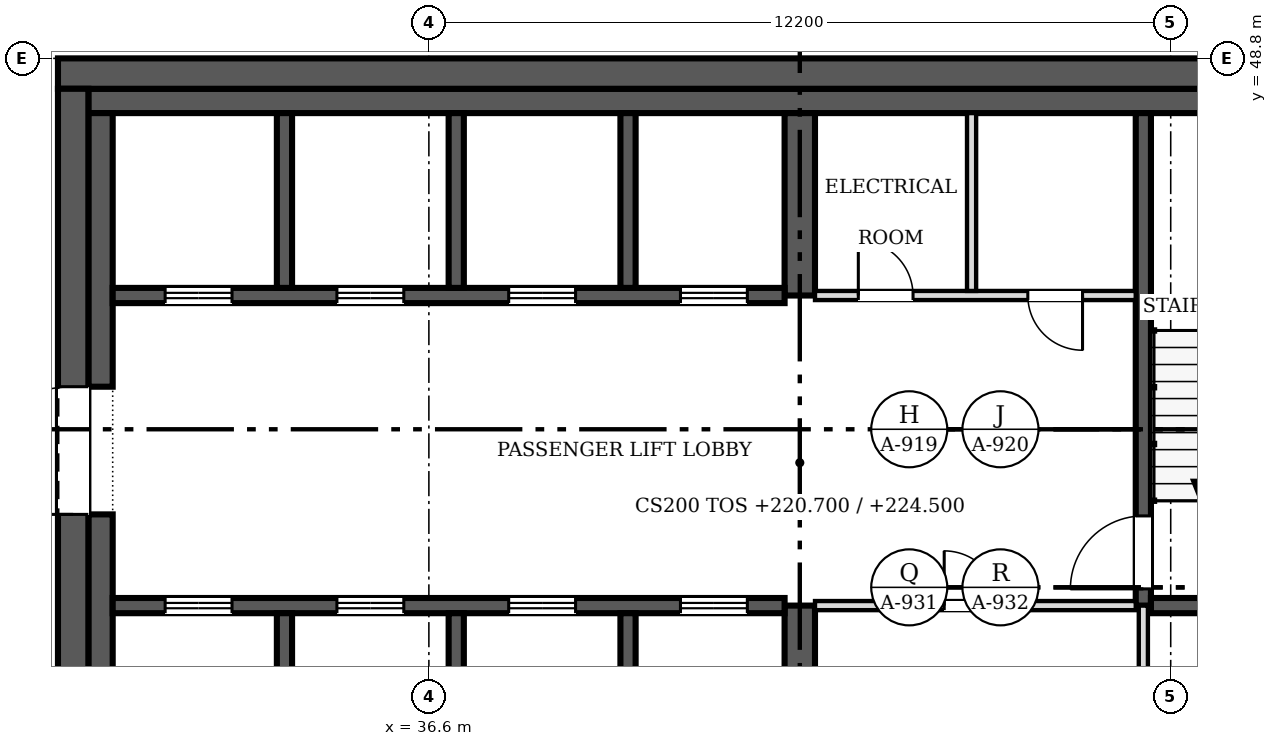
"""IFC4 building model, lengths in metres.
Left out: names, types, materials, properties, quantities, classifications, styles, units other than length and angle.
Written with IfcOpenShell. Run it as: python <this file> out.ifc"""

import sys

from ifc_helpers import new_model, si_unit, direction, frame, frame_2d, origin, place, context, subcontext, project, spatial, rectangle, extrude, source, transform, mapped, element, fill, save


model = new_model("IFC4")
c1 = context("Model", 3, precision=1e-05, world=origin(), true_north=direction((0.0, 1.0)))
c2 = subcontext(c1, "Body", "Model", "MODEL_VIEW")
j1 = project(units=[si_unit("LENGTHUNIT", "METRE"), si_unit("PLANEANGLEUNIT", "RADIAN")], contexts=[c1])
p1 = place(None, origin())
s1 = spatial("IfcSite", under=j1, at=p1, CompositionType="ELEMENT")
p2 = place(p1, origin())
s2 = spatial("IfcBuilding", under=s1, at=p2, CompositionType="ELEMENT")
p3 = place(p2, frame((0.0, 0.0, 220.7)))
s3 = spatial("IfcBuildingStorey", under=s2, at=p3, CompositionType="ELEMENT", Elevation=220.7)
p4 = place(p3, frame((30.75, 24.9, 0.0), z_axis=(0.0, 0.0, 1.0), x_axis=(0.0, 1.0, 0.0)))
e1 = element("IfcWall", 1, at=p4, inside=s3, PredefinedType="SHEAR", context=c2, shape_type="SweptSolid", body=[
    extrude(rectangle(XDim=23.4, YDim=0.5, at=frame_2d((11.7, 0.0))), origin(), (0.0, 0.0, 1.0), 3.8),
])
m1 = source(origin(), c2, "Body", "SweptSolid", [
    extrude(rectangle(XDim=2.1, YDim=2.4, at=frame_2d((1.05, 1.2))), frame((0.0, 0.26, 0.0), z_axis=(0.0, -1.0, 0.0), x_axis=(1.0, 0.0, 0.0)), (0.0, 0.0, 1.0), 0.52),
])
p5 = place(p4, frame((4.9, 0.0, 0.0)))
e2 = element("IfcOpeningElement", 2, at=p5, cuts=e1, PredefinedType="OPENING", context=c2, shape_type="MappedRepresentation", body=[
    mapped(m1, transform((0.0, 0.0, 0.0), scale=1.0)),
])
p6 = place(p4, frame((16.4, 0.0, 0.0)))
e3 = element("IfcOpeningElement", 3, at=p6, cuts=e1, PredefinedType="OPENING", context=c2, shape_type="MappedRepresentation", body=[
    mapped(m1, transform((0.0, 0.0, 0.0), scale=1.0)),
])
p7 = place(p3, frame((30.5, 48.55, 0.0), z_axis=(0.0, 0.0, 1.0), x_axis=(1.0, 0.0, 0.0)))
e4 = element("IfcWall", 4, at=p7, inside=s3, PredefinedType="SHEAR", context=c2, shape_type="SweptSolid", body=[
    extrude(rectangle(XDim=24.4, YDim=0.5, at=frame_2d((12.2, 0.0))), origin(), (0.0, 0.0, 1.0), 3.8),
])
p8 = place(p3, frame((31.0, 48.1, 0.0), z_axis=(0.0, 0.0, 1.0), x_axis=(1.0, 0.0, 0.0)))
e5 = element("IfcWall", 5, at=p8, inside=s3, PredefinedType="SOLIDWALL", context=c2, shape_type="SweptSolid", body=[
    extrude(rectangle(XDim=23.4, YDim=0.4, at=frame_2d((11.7, 0.0))), origin(), (0.0, 0.0, 1.0), 3.8),
])
p9 = place(p3, frame((31.2, 31.9, 0.0), z_axis=(0.0, 0.0, 1.0), x_axis=(0.0, 1.0, 0.0)))
e6 = element("IfcWall", 6, at=p9, inside=s3, PredefinedType="SOLIDWALL", context=c2, shape_type="SweptSolid", body=[
    extrude(rectangle(XDim=9.4, YDim=0.4, at=frame_2d((4.7, 0.0))), origin(), (0.0, 0.0, 1.0), 3.8),
])
p10 = place(p3, frame((31.2, 43.4, 0.0), z_axis=(0.0, 0.0, 1.0), x_axis=(0.0, 1.0, 0.0)))
e7 = element("IfcWall", 7, at=p10, inside=s3, PredefinedType="SOLIDWALL", context=c2, shape_type="SweptSolid", body=[
    extrude(rectangle(XDim=4.5, YDim=0.4, at=frame_2d((2.25, 0.0))), origin(), (0.0, 0.0, 1.0), 3.8),
])
p11 = place(p3, frame((42.7, 36.85, 0.0), z_axis=(0.0, 0.0, 1.0), x_axis=(0.0, 1.0, 0.0)))
e8 = element("IfcWall", 8, at=p11, inside=s3, PredefinedType="SHEAR", context=c2, shape_type="SweptSolid", body=[
    extrude(rectangle(XDim=2.95, YDim=0.5, at=frame_2d((1.475, 0.0))), origin(), (0.0, 0.0, 1.0), 3.8),
])
p12 = place(p3, frame((42.7, 44.9, 0.0), z_axis=(0.0, 0.0, 1.0), x_axis=(0.0, 1.0, 0.0)))
e9 = element("IfcWall", 9, at=p12, inside=s3, PredefinedType="SHEAR", context=c2, shape_type="SweptSolid", body=[
    extrude(rectangle(XDim=3.0, YDim=0.5, at=frame_2d((1.5, 0.0))), origin(), (0.0, 0.0, 1.0), 3.8),
])
p13 = place(p3, frame((31.4, 39.8, 0.0), z_axis=(0.0, 0.0, 1.0), x_axis=(1.0, 0.0, 0.0)))
e10 = element("IfcWall", 10, at=p13, inside=s3, PredefinedType="SOLIDWALL", context=c2, shape_type="SweptSolid", body=[
    extrude(rectangle(XDim=11.05, YDim=0.25, at=frame_2d((5.525, 0.0))), origin(), (0.0, 0.0, 1.0), 3.8),
])
m2 = source(origin(), c2, "Body", "SweptSolid", [
    extrude(rectangle(XDim=1.1, YDim=2.1, at=frame_2d((0.55, 1.05))), frame((0.0, 0.135, 0.0), z_axis=(0.0, -1.0, 0.0), x_axis=(1.0, 0.0, 0.0)), (0.0, 0.0, 1.0), 0.27),
])
p14 = place(p13, frame((0.863, 0.0, 0.0)))
e11 = element("IfcOpeningElement", 11, at=p14, cuts=e10, PredefinedType="OPENING", context=c2, shape_type="MappedRepresentation", body=[
    mapped(m2, transform((0.0, 0.0, 0.0), scale=1.0)),
])
p15 = place(p13, frame((3.688, 0.0, 0.0)))
e12 = element("IfcOpeningElement", 12, at=p15, cuts=e10, PredefinedType="OPENING", context=c2, shape_type="MappedRepresentation", body=[
    mapped(m2, transform((0.0, 0.0, 0.0), scale=1.0)),
])
p16 = place(p13, frame((6.512, 0.0, 0.0)))
e13 = element("IfcOpeningElement", 13, at=p16, cuts=e10, PredefinedType="OPENING", context=c2, shape_type="MappedRepresentation", body=[
    mapped(m2, transform((0.0, 0.0, 0.0), scale=1.0)),
])
p17 = place(p13, frame((9.337, 0.0, 0.0)))
e14 = element("IfcOpeningElement", 14, at=p17, cuts=e10, PredefinedType="OPENING", context=c2, shape_type="MappedRepresentation", body=[
    mapped(m2, transform((0.0, 0.0, 0.0), scale=1.0)),
])
p18 = place(p3, frame((42.45, 44.9, 0.0), z_axis=(0.0, 0.0, 1.0), x_axis=(-1.0, 0.0, 0.0)))
e15 = element("IfcWall", 15, at=p18, inside=s3, PredefinedType="SOLIDWALL", context=c2, shape_type="SweptSolid", body=[
    extrude(rectangle(XDim=11.05, YDim=0.25, at=frame_2d((5.525, 0.0))), origin(), (0.0, 0.0, 1.0), 3.8),
])
p19 = place(p18, frame((9.087, 0.0, 0.0)))
e16 = element("IfcOpeningElement", 16, at=p19, cuts=e15, PredefinedType="OPENING", context=c2, shape_type="MappedRepresentation", body=[
    mapped(m2, transform((0.0, 0.0, 0.0), scale=1.0)),
])
p20 = place(p18, frame((6.262, 0.0, 0.0)))
e17 = element("IfcOpeningElement", 17, at=p20, cuts=e15, PredefinedType="OPENING", context=c2, shape_type="MappedRepresentation", body=[
    mapped(m2, transform((0.0, 0.0, 0.0), scale=1.0)),
])
p21 = place(p18, frame((3.438, 0.0, 0.0)))
e18 = element("IfcOpeningElement", 18, at=p21, cuts=e15, PredefinedType="OPENING", context=c2, shape_type="MappedRepresentation", body=[
    mapped(m2, transform((0.0, 0.0, 0.0), scale=1.0)),
])
p22 = place(p18, frame((0.613, 0.0, 0.0)))
e19 = element("IfcOpeningElement", 19, at=p22, cuts=e15, PredefinedType="OPENING", context=c2, shape_type="MappedRepresentation", body=[
    mapped(m2, transform((0.0, 0.0, 0.0), scale=1.0)),
])
p23 = place(p3, frame((48.35, 47.9, 0.0), z_axis=(0.0, 0.0, 1.0), x_axis=(0.0, -1.0, 0.0)))
e20 = element("IfcWall", 20, at=p23, inside=s3, PredefinedType="SOLIDWALL", context=c2, shape_type="SweptSolid", body=[
    extrude(rectangle(XDim=8.1, YDim=0.25, at=frame_2d((4.05, 0.0))), origin(), (0.0, 0.0, 1.0), 3.8),
])
m3 = source(origin(), c2, "Body", "SweptSolid", [
    extrude(rectangle(XDim=1.2, YDim=2.1, at=frame_2d((0.6, 1.05))), frame((0.0, 0.135, 0.0), z_axis=(0.0, -1.0, 0.0), x_axis=(1.0, 0.0, 0.0)), (0.0, 0.0, 1.0), 0.27),
])
p24 = place(p23, frame((6.625, 0.0, 0.0)))
e21 = element("IfcOpeningElement", 21, at=p24, cuts=e20, PredefinedType="OPENING", context=c2, shape_type="MappedRepresentation", body=[
    mapped(m3, transform((0.0, 0.0, 0.0), scale=1.0)),
])
p25 = place(p3, frame((48.475, 39.8, 0.0), z_axis=(0.0, 0.0, 1.0), x_axis=(1.0, 0.0, 0.0)))
e22 = element("IfcWall", 22, at=p25, inside=s3, PredefinedType="SOLIDWALL", context=c2, shape_type="SweptSolid", body=[
    extrude(rectangle(XDim=3.4, YDim=0.25, at=frame_2d((1.7, 0.0))), origin(), (0.0, 0.0, 1.0), 3.8),
])
for number, where, z_axis, x_axis in (
    (23, (34.225, 36.85, 0.0), (0.0, 0.0, 1.0), (0.0, 1.0, 0.0)),
    (24, (37.05, 36.85, 0.0), (0.0, 0.0, 1.0), (0.0, 1.0, 0.0)),
    (25, (39.875, 36.85, 0.0), (0.0, 0.0, 1.0), (0.0, 1.0, 0.0)),
):
    element("IfcWall", number, at=place(p3, frame(where, z_axis=z_axis, x_axis=x_axis)), inside=s3, PredefinedType="SOLIDWALL", context=c2, shape_type="SweptSolid", body=[
        extrude(rectangle(XDim=2.825, YDim=0.25, at=frame_2d((1.413, 0.0))), origin(), (0.0, 0.0, 1.0), 3.8),
    ])
for number, where, z_axis, x_axis in (
    (26, (34.225, 45.025, 0.0), (0.0, 0.0, 1.0), (0.0, 1.0, 0.0)),
    (27, (37.05, 45.025, 0.0), (0.0, 0.0, 1.0), (0.0, 1.0, 0.0)),
    (28, (39.875, 45.025, 0.0), (0.0, 0.0, 1.0), (0.0, 1.0, 0.0)),
):
    element("IfcWall", number, at=place(p3, frame(where, z_axis=z_axis, x_axis=x_axis)), inside=s3, PredefinedType="SOLIDWALL", context=c2, shape_type="SweptSolid", body=[
        extrude(rectangle(XDim=2.875, YDim=0.25, at=frame_2d((1.438, 0.0))), origin(), (0.0, 0.0, 1.0), 3.8),
    ])
p26 = place(p3, frame((48.225, 39.8, 0.0), z_axis=(0.0, 0.0, 1.0), x_axis=(-1.0, 0.0, 0.0)))
e29 = element("IfcWall", 29, at=p26, inside=s3, PredefinedType="PARTITIONING", context=c2, shape_type="SweptSolid", body=[
    extrude(rectangle(XDim=5.275, YDim=0.15, at=frame_2d((2.638, 0.0))), origin(), (0.0, 0.0, 1.0), 3.6),
])
m4 = source(origin(), c2, "Body", "SweptSolid", [
    extrude(rectangle(XDim=0.9, YDim=2.1, at=frame_2d((0.45, 1.05))), frame((0.0, 0.085, 0.0), z_axis=(0.0, -1.0, 0.0), x_axis=(1.0, 0.0, 0.0)), (0.0, 0.0, 1.0), 0.17),
])
p27 = place(p26, frame((2.25, 0.0, 0.0)))
e30 = element("IfcOpeningElement", 30, at=p27, cuts=e29, PredefinedType="OPENING", context=c2, shape_type="MappedRepresentation", body=[
    mapped(m4, transform((0.0, 0.0, 0.0), scale=1.0)),
])
p28 = place(p3, frame((42.95, 44.9, 0.0), z_axis=(0.0, 0.0, 1.0), x_axis=(1.0, 0.0, 0.0)))
e31 = element("IfcWall", 31, at=p28, inside=s3, PredefinedType="PARTITIONING", context=c2, shape_type="SweptSolid", body=[
    extrude(rectangle(XDim=5.275, YDim=0.15, at=frame_2d((2.638, 0.0))), origin(), (0.0, 0.0, 1.0), 3.6),
])
p29 = place(p28, frame((0.712, 0.0, 0.0)))
e32 = element("IfcOpeningElement", 32, at=p29, cuts=e31, PredefinedType="OPENING", context=c2, shape_type="MappedRepresentation", body=[
    mapped(m4, transform((0.0, 0.0, 0.0), scale=1.0)),
])
p30 = place(p28, frame((3.5, 0.0, 0.0)))
e33 = element("IfcOpeningElement", 33, at=p30, cuts=e31, PredefinedType="OPENING", context=c2, shape_type="MappedRepresentation", body=[
    mapped(m4, transform((0.0, 0.0, 0.0), scale=1.0)),
])
p31 = place(p3, frame((48.35, 36.85, 0.0), z_axis=(0.0, 0.0, 1.0), x_axis=(0.0, 1.0, 0.0)))
e34 = element("IfcWall", 34, at=p31, inside=s3, PredefinedType="PARTITIONING", context=c2, shape_type="SweptSolid", body=[
    extrude(rectangle(XDim=2.95, YDim=0.15, at=frame_2d((1.475, 0.0))), origin(), (0.0, 0.0, 1.0), 3.6),
])
p32 = place(p3, frame((45.525, 44.975, 0.0), z_axis=(0.0, 0.0, 1.0), x_axis=(0.0, 1.0, 0.0)))
e35 = element("IfcWall", 35, at=p32, inside=s3, PredefinedType="PARTITIONING", context=c2, shape_type="SweptSolid", body=[
    extrude(rectangle(XDim=2.925, YDim=0.15, at=frame_2d((1.462, 0.0))), origin(), (0.0, 0.0, 1.0), 3.6),
])
m5 = source(origin(), c2, "Body", "SweptSolid", [
    extrude(rectangle(XDim=2.1, YDim=2.4, at=frame_2d((1.05, 1.2))), frame((0.0, 0.025, 0.0), z_axis=(0.0, -1.0, 0.0), x_axis=(1.0, 0.0, 0.0)), (0.0, 0.0, 1.0), 0.05),
])
p33 = place(p6, origin())
e36 = element("IfcDoor", 36, at=p33, inside=s3, OperationType="DOUBLE_DOOR_SINGLE_SWING", PredefinedType="DOOR", context=c2, shape_type="MappedRepresentation", body=[
    mapped(m5, transform((0.0, 0.0, 0.0), scale=1.0)),
])
fill(e3, e36)
m6 = source(origin(), c2, "Body", "SweptSolid", [
    extrude(rectangle(XDim=1.1, YDim=2.1, at=frame_2d((0.55, 1.05))), frame((0.0, 0.025, 0.0), z_axis=(0.0, -1.0, 0.0), x_axis=(1.0, 0.0, 0.0)), (0.0, 0.0, 1.0), 0.05),
])
p34 = place(p14, origin())
e37 = element("IfcDoor", 37, at=p34, inside=s3, OperationType="DOUBLE_DOOR_SLIDING", PredefinedType="DOOR", context=c2, shape_type="MappedRepresentation", body=[
    mapped(m6, transform((0.0, 0.0, 0.0), scale=1.0)),
])
fill(e11, e37)
p35 = place(p15, origin())
e38 = element("IfcDoor", 38, at=p35, inside=s3, OperationType="DOUBLE_DOOR_SLIDING", PredefinedType="DOOR", context=c2, shape_type="MappedRepresentation", body=[
    mapped(m6, transform((0.0, 0.0, 0.0), scale=1.0)),
])
fill(e12, e38)
p36 = place(p16, origin())
e39 = element("IfcDoor", 39, at=p36, inside=s3, OperationType="DOUBLE_DOOR_SLIDING", PredefinedType="DOOR", context=c2, shape_type="MappedRepresentation", body=[
    mapped(m6, transform((0.0, 0.0, 0.0), scale=1.0)),
])
fill(e13, e39)
p37 = place(p17, origin())
e40 = element("IfcDoor", 40, at=p37, inside=s3, OperationType="DOUBLE_DOOR_SLIDING", PredefinedType="DOOR", context=c2, shape_type="MappedRepresentation", body=[
    mapped(m6, transform((0.0, 0.0, 0.0), scale=1.0)),
])
fill(e14, e40)
p38 = place(p19, origin())
e41 = element("IfcDoor", 41, at=p38, inside=s3, OperationType="DOUBLE_DOOR_SLIDING", PredefinedType="DOOR", context=c2, shape_type="MappedRepresentation", body=[
    mapped(m6, transform((0.0, 0.0, 0.0), scale=1.0)),
])
fill(e16, e41)
p39 = place(p20, origin())
e42 = element("IfcDoor", 42, at=p39, inside=s3, OperationType="DOUBLE_DOOR_SLIDING", PredefinedType="DOOR", context=c2, shape_type="MappedRepresentation", body=[
    mapped(m6, transform((0.0, 0.0, 0.0), scale=1.0)),
])
fill(e17, e42)
p40 = place(p21, origin())
e43 = element("IfcDoor", 43, at=p40, inside=s3, OperationType="DOUBLE_DOOR_SLIDING", PredefinedType="DOOR", context=c2, shape_type="MappedRepresentation", body=[
    mapped(m6, transform((0.0, 0.0, 0.0), scale=1.0)),
])
fill(e18, e43)
p41 = place(p22, origin())
e44 = element("IfcDoor", 44, at=p41, inside=s3, OperationType="DOUBLE_DOOR_SLIDING", PredefinedType="DOOR", context=c2, shape_type="MappedRepresentation", body=[
    mapped(m6, transform((0.0, 0.0, 0.0), scale=1.0)),
])
fill(e19, e44)
m7 = source(origin(), c2, "Body", "SweptSolid", [
    extrude(rectangle(XDim=1.2, YDim=2.1, at=frame_2d((0.6, 1.05))), frame((0.0, 0.025, 0.0), z_axis=(0.0, -1.0, 0.0), x_axis=(1.0, 0.0, 0.0)), (0.0, 0.0, 1.0), 0.05),
])
p42 = place(p24, origin())
e45 = element("IfcDoor", 45, at=p42, inside=s3, OperationType="SINGLE_SWING_RIGHT", PredefinedType="DOOR", context=c2, shape_type="MappedRepresentation", body=[
    mapped(m7, transform((0.0, 0.0, 0.0), scale=1.0)),
])
fill(e21, e45)
m8 = source(origin(), c2, "Body", "SweptSolid", [
    extrude(rectangle(XDim=0.9, YDim=2.1, at=frame_2d((0.45, 1.05))), frame((0.0, 0.025, 0.0), z_axis=(0.0, -1.0, 0.0), x_axis=(1.0, 0.0, 0.0)), (0.0, 0.0, 1.0), 0.05),
])
p43 = place(p27, origin())
e46 = element("IfcDoor", 46, at=p43, inside=s3, OperationType="SINGLE_SWING_RIGHT", PredefinedType="DOOR", context=c2, shape_type="MappedRepresentation", body=[
    mapped(m8, transform((0.0, 0.0, 0.0), scale=1.0)),
])
fill(e30, e46)
p44 = place(p29, origin())
e47 = element("IfcDoor", 47, at=p44, inside=s3, OperationType="SINGLE_SWING_LEFT", PredefinedType="DOOR", context=c2, shape_type="MappedRepresentation", body=[
    mapped(m8, transform((0.0, 0.0, 0.0), scale=1.0)),
])
fill(e32, e47)
p45 = place(p30, origin())
e48 = element("IfcDoor", 48, at=p45, inside=s3, OperationType="SINGLE_SWING_RIGHT", PredefinedType="DOOR", context=c2, shape_type="MappedRepresentation", body=[
    mapped(m8, transform((0.0, 0.0, 0.0), scale=1.0)),
])
fill(e33, e48)
save(model, sys.argv[1])
